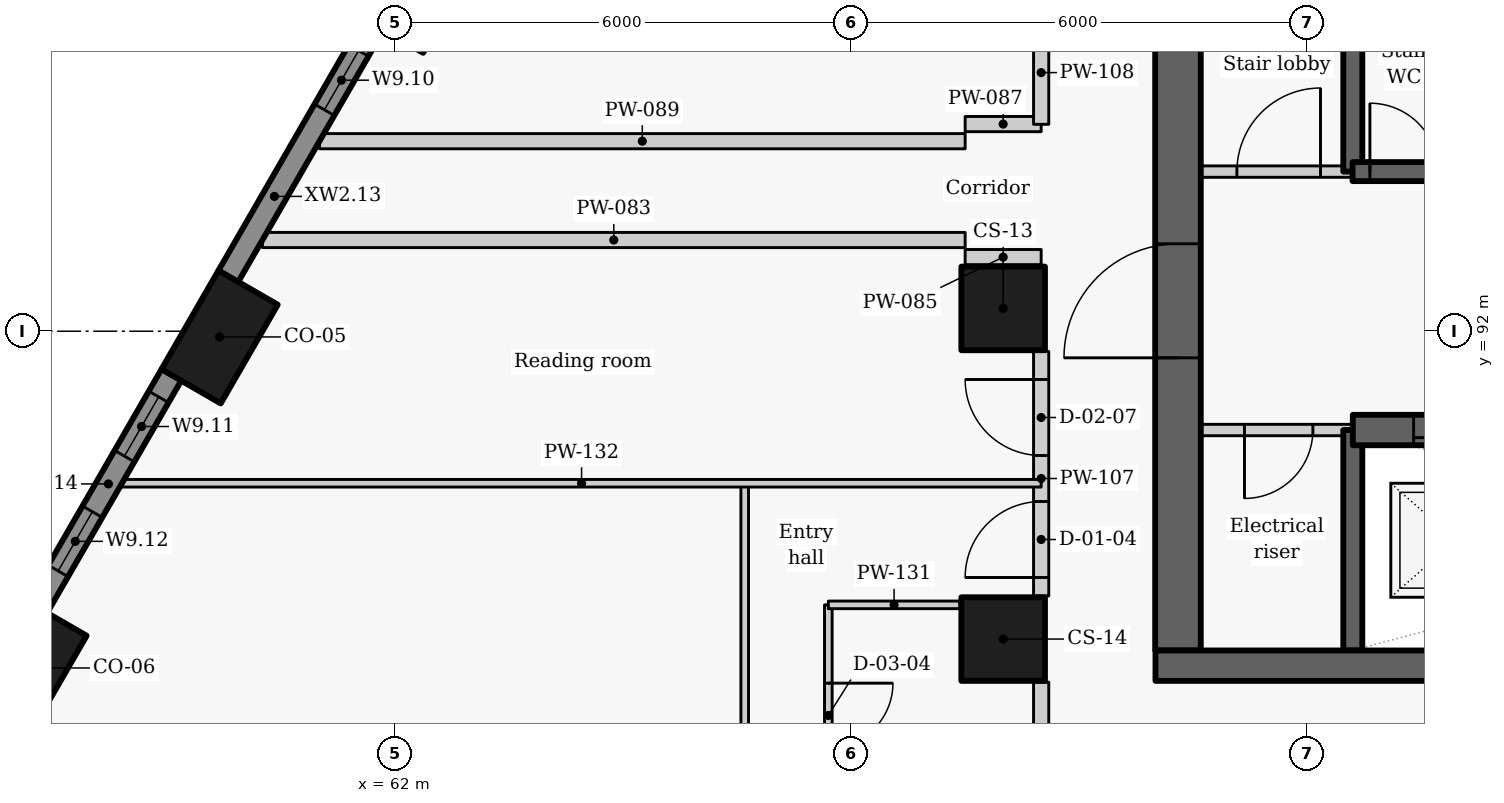
"""IFC4 building model, lengths in metres.
Left out: names, types, materials, properties, quantities, classifications, styles, units other than length and angle.
Written with IfcOpenShell. Run it as: python <this file> out.ifc"""

import sys

from ifc_helpers import new_model, si_unit, direction, frame, frame_2d, origin, origin_2d, place, context, subcontext, project, spatial, rectangle, extrude, element, fill, save


model = new_model("IFC4")
c1 = context("Model", 3, precision=1e-05, world=origin(), true_north=direction((0.0, 1.0)))
c2 = subcontext(c1, "Body", "Model", "MODEL_VIEW")
j1 = project(units=[si_unit("LENGTHUNIT", "METRE"), si_unit("PLANEANGLEUNIT", "RADIAN")], contexts=[c1])
p1 = place(None, origin())
s1 = spatial("IfcSite", under=j1, at=p1, CompositionType="ELEMENT")
p2 = place(p1, origin())
s2 = spatial("IfcBuilding", under=s1, at=p2, CompositionType="ELEMENT")
p3 = place(p2, frame((0.0, 0.0, 51.3)))
s3 = spatial("IfcBuildingStorey", under=s2, at=p3, CompositionType="ELEMENT", Elevation=51.3)
for number, where, z_axis, x_axis in (
    (1, (62.354, 96.537, 0.0), (0.0, 0.0, 1.0), (-0.5, -0.866, 0.0)),
    (2, (59.692, 91.925, 0.0), (0.0, 0.0, 1.0), (-0.5, -0.866, 0.0)),
    (3, (57.177, 87.57, 0.0), (0.0, 0.0, 1.0), (-0.5, -0.866, 0.0)),
):
    element("IfcColumn", number, at=place(p3, frame(where, z_axis=z_axis, x_axis=x_axis)), inside=s3, PredefinedType="COLUMN", context=c2, shape_type="SweptSolid", body=[
        extrude(rectangle(XDim=1.5, YDim=0.9, at=origin_2d()), origin(), (0.0, 0.0, 1.0), 3.3),
    ])
for number, where, z_axis, x_axis in (
    (4, (70.0, 92.3, 0.0), (0.0, 0.0, 1.0), (0.0, -1.0, 0.0)),
    (5, (70.0, 87.95, 0.0), (0.0, 0.0, 1.0), (0.0, -1.0, 0.0)),
):
    element("IfcColumn", number, at=place(p3, frame(where, z_axis=z_axis, x_axis=x_axis)), inside=s3, PredefinedType="COLUMN", context=c2, shape_type="SweptSolid", body=[
        extrude(rectangle(XDim=1.1, YDim=1.1, at=origin_2d()), origin(), (0.0, 0.0, 1.0), 3.3),
    ])
p4 = place(p3, frame((61.722, 96.041, 0.0), z_axis=(0.0, 0.0, 1.0), x_axis=(-0.500001735503, -0.866024401789, 0.0)))
e6 = element("IfcWall", 6, at=p4, inside=s3, PredefinedType="SOLIDWALL", context=c2, shape_type="SweptSolid", body=[
    extrude(rectangle(XDim=3.834, YDim=0.3, at=frame_2d((1.917, 0.0))), origin(), (0.0, 0.0, 1.0), 2.425),
])
p5 = place(p4, frame((0.403, 0.0, 0.9)))
e7 = element("IfcOpeningElement", 7, at=p5, cuts=e6, PredefinedType="OPENING", context=c2, shape_type="SweptSolid", body=[
    extrude(rectangle(XDim=0.9, YDim=1.1, at=frame_2d((0.45, 0.55))), frame((0.0, 0.16, 0.0), z_axis=(0.0, -1.0, 0.0), x_axis=(1.0, 0.0, 0.0)), (0.0, 0.0, 1.0), 0.32),
])
p6 = place(p3, frame((59.059, 91.429, 0.0), z_axis=(0.0, 0.0, 1.0), x_axis=(-0.499977402622, -0.866038449993, 0.0)))
e8 = element("IfcWall", 8, at=p6, inside=s3, PredefinedType="SOLIDWALL", context=c2, shape_type="SweptSolid", body=[
    extrude(rectangle(XDim=3.537, YDim=0.3, at=frame_2d((1.769, 0.0))), origin(), (0.0, 0.0, 1.0), 2.425),
])
p7 = place(p6, frame((0.338, 0.0, 0.9)))
e9 = element("IfcOpeningElement", 9, at=p7, cuts=e8, PredefinedType="OPENING", context=c2, shape_type="SweptSolid", body=[
    extrude(rectangle(XDim=0.9, YDim=1.1, at=frame_2d((0.45, 0.55))), frame((0.0, 0.16, 0.0), z_axis=(0.0, -1.0, 0.0), x_axis=(1.0, 0.0, 0.0)), (0.0, 0.0, 1.0), 0.32),
])
p8 = place(p6, frame((2.082, 0.0, 0.9)))
e10 = element("IfcOpeningElement", 10, at=p8, cuts=e8, PredefinedType="OPENING", context=c2, shape_type="SweptSolid", body=[
    extrude(rectangle(XDim=0.9, YDim=1.1, at=frame_2d((0.45, 0.55))), frame((0.0, 0.16, 0.0), z_axis=(0.0, -1.0, 0.0), x_axis=(1.0, 0.0, 0.0)), (0.0, 0.0, 1.0), 0.32),
])
p9 = place(p3, frame((74.6, 87.8, -0.275), z_axis=(0.0, 0.0, 1.0), x_axis=(0.0, 1.0, 0.0)))
e11 = element("IfcWall", 11, at=p9, inside=s3, PredefinedType="SHEAR", context=c2, shape_type="SweptSolid", body=[
    extrude(rectangle(XDim=2.9, YDim=0.25, at=frame_2d((1.45, 0.0))), origin(), (0.0, 0.0, 1.0), 3.3),
])
p10 = place(p3, frame((74.6, 94.1, -0.275), z_axis=(0.0, 0.0, 1.0), x_axis=(0.0, 1.0, 0.0)))
e12 = element("IfcWall", 12, at=p10, inside=s3, PredefinedType="SHEAR", context=c2, shape_type="SweptSolid", body=[
    extrude(rectangle(XDim=2.8, YDim=0.25, at=frame_2d((1.4, 0.0))), origin(), (0.0, 0.0, 1.0), 3.3),
])
p11 = place(p3, frame((74.6, 90.7, 0.0), z_axis=(0.0, 0.0, 1.0), x_axis=(-1.0, 0.0, 0.0)))
e13 = element("IfcWall", 13, at=p11, inside=s3, PredefinedType="PARTITIONING", context=c2, shape_type="SweptSolid", body=[
    extrude(rectangle(XDim=2.6, YDim=0.15, at=frame_2d((1.3, 0.0))), origin(), (0.0, 0.0, 1.0), 3.025),
])
p12 = place(p11, frame((0.525, 0.0, 0.0)))
e14 = element("IfcOpeningElement", 14, at=p12, cuts=e13, PredefinedType="OPENING", context=c2, shape_type="SweptSolid", body=[
    extrude(rectangle(XDim=0.9, YDim=2.1, at=frame_2d((0.45, 1.05))), frame((0.0, 0.085, 0.0), z_axis=(0.0, -1.0, 0.0), x_axis=(1.0, 0.0, 0.0)), (0.0, 0.0, 1.0), 0.17),
])
p13 = place(p3, frame((72.3, 87.8, -0.275), z_axis=(0.0, 0.0, 1.0), x_axis=(0.0, 1.0, 0.0)))
e15 = element("IfcWall", 15, at=p13, inside=s3, PredefinedType="SHEAR", context=c2, shape_type="SweptSolid", body=[
    extrude(rectangle(XDim=9.1, YDim=0.6, at=frame_2d((4.55, 0.0))), origin(), (0.0, 0.0, 1.0), 3.3),
])
p14 = place(p13, frame((3.85, 0.0, 0.275)))
e16 = element("IfcOpeningElement", 16, at=p14, cuts=e15, PredefinedType="OPENING", context=c2, shape_type="SweptSolid", body=[
    extrude(rectangle(XDim=1.5, YDim=2.1, at=frame_2d((0.75, 1.05))), frame((0.0, 0.31, 0.0), z_axis=(0.0, -1.0, 0.0), x_axis=(1.0, 0.0, 0.0)), (0.0, 0.0, 1.0), 0.62),
])
p15 = place(p3, frame((74.6, 90.7, -0.275), z_axis=(0.0, 0.0, 1.0), x_axis=(1.0, 0.0, 0.0)))
e17 = element("IfcWall", 17, at=p15, inside=s3, PredefinedType="SHEAR", context=c2, shape_type="SweptSolid", body=[
    extrude(rectangle(XDim=10.8, YDim=0.4, at=frame_2d((5.4, 0.0))), origin(), (0.0, 0.0, 1.0), 3.3),
])
p16 = place(p15, frame((0.8, 0.0, 0.275)))
e18 = element("IfcOpeningElement", 18, at=p16, cuts=e17, PredefinedType="OPENING", context=c2, shape_type="SweptSolid", body=[
    extrude(rectangle(XDim=1.1, YDim=2.1, at=frame_2d((0.55, 1.05))), frame((0.0, 0.21, 0.0), z_axis=(0.0, -1.0, 0.0), x_axis=(1.0, 0.0, 0.0)), (0.0, 0.0, 1.0), 0.42),
])
p17 = place(p15, frame((3.5, 0.0, 0.275)))
e19 = element("IfcOpeningElement", 19, at=p17, cuts=e17, PredefinedType="OPENING", context=c2, shape_type="SweptSolid", body=[
    extrude(rectangle(XDim=1.1, YDim=2.1, at=frame_2d((0.55, 1.05))), frame((0.0, 0.21, 0.0), z_axis=(0.0, -1.0, 0.0), x_axis=(1.0, 0.0, 0.0)), (0.0, 0.0, 1.0), 0.42),
])
p18 = place(p15, frame((6.2, 0.0, 0.275)))
e20 = element("IfcOpeningElement", 20, at=p18, cuts=e17, PredefinedType="OPENING", context=c2, shape_type="SweptSolid", body=[
    extrude(rectangle(XDim=1.1, YDim=2.1, at=frame_2d((0.55, 1.05))), frame((0.0, 0.21, 0.0), z_axis=(0.0, -1.0, 0.0), x_axis=(1.0, 0.0, 0.0)), (0.0, 0.0, 1.0), 0.42),
])
p19 = place(p3, frame((72.0, 94.1, 0.0), z_axis=(0.0, 0.0, 1.0), x_axis=(1.0, 0.0, 0.0)))
e21 = element("IfcWall", 21, at=p19, inside=s3, PredefinedType="PARTITIONING", context=c2, shape_type="SweptSolid", body=[
    extrude(rectangle(XDim=2.603, YDim=0.15, at=frame_2d((1.302, 0.0))), origin(), (0.0, 0.0, 1.0), 3.025),
])
p20 = place(p19, frame((1.075, 0.0, 0.0)))
e22 = element("IfcOpeningElement", 22, at=p20, cuts=e21, PredefinedType="OPENING", context=c2, shape_type="SweptSolid", body=[
    extrude(rectangle(XDim=1.1, YDim=2.1, at=frame_2d((0.55, 1.05))), frame((0.0, 0.085, 0.0), z_axis=(0.0, -1.0, 0.0), x_axis=(1.0, 0.0, 0.0)), (0.0, 0.0, 1.0), 0.17),
])
p21 = place(p3, frame((74.597, 94.1, -0.275), z_axis=(0.0, 0.0, 1.0), x_axis=(1.0, 0.0, 0.0)))
e23 = element("IfcWall", 23, at=p21, inside=s3, PredefinedType="SHEAR", context=c2, shape_type="SweptSolid", body=[
    extrude(rectangle(XDim=2.706, YDim=0.25, at=frame_2d((1.353, 0.0))), origin(), (0.0, 0.0, 1.0), 3.3),
])
p22 = place(p21, frame((0.228, 0.0, 0.275)))
e24 = element("IfcOpeningElement", 24, at=p22, cuts=e23, PredefinedType="OPENING", context=c2, shape_type="SweptSolid", body=[
    extrude(rectangle(XDim=0.9, YDim=2.1, at=frame_2d((0.45, 1.05))), frame((0.0, 0.135, 0.0), z_axis=(0.0, -1.0, 0.0), x_axis=(1.0, 0.0, 0.0)), (0.0, 0.0, 1.0), 0.27),
])
p23 = place(p21, frame((1.578, 0.0, 0.275)))
e25 = element("IfcOpeningElement", 25, at=p23, cuts=e23, PredefinedType="OPENING", context=c2, shape_type="SweptSolid", body=[
    extrude(rectangle(XDim=0.9, YDim=2.1, at=frame_2d((0.45, 1.05))), frame((0.0, 0.135, 0.0), z_axis=(0.0, -1.0, 0.0), x_axis=(1.0, 0.0, 0.0)), (0.0, 0.0, 1.0), 0.27),
])
p24 = place(p3, frame((60.255, 93.2, 0.0), z_axis=(0.0, 0.0, 1.0), x_axis=(1.0, 0.0, 0.0)))
e26 = element("IfcWall", 26, at=p24, inside=s3, PredefinedType="PARTITIONING", context=c2, shape_type="SweptSolid", body=[
    extrude(rectangle(XDim=9.245, YDim=0.2, at=frame_2d((4.623, 0.0))), origin(), (0.0, 0.0, 1.0), 2.405),
])
for number, where, z_axis, x_axis in (
    (27, (69.5, 92.975, 0.0), (0.0, 0.0, 1.0), (1.0, 0.0, 0.0)),
    (28, (69.5, 94.725, 0.0), (0.0, 0.0, 1.0), (1.0, 0.0, 0.0)),
):
    element("IfcWall", number, at=place(p3, frame(where, z_axis=z_axis, x_axis=x_axis)), inside=s3, PredefinedType="PARTITIONING", context=c2, shape_type="SweptSolid", body=[
        extrude(rectangle(XDim=1.0, YDim=0.2, at=frame_2d((0.5, 0.0))), origin(), (0.0, 0.0, 1.0), 2.505),
    ])
p25 = place(p3, frame((61.005, 94.5, 0.0), z_axis=(0.0, 0.0, 1.0), x_axis=(1.0, 0.0, 0.0)))
e29 = element("IfcWall", 29, at=p25, inside=s3, PredefinedType="PARTITIONING", context=c2, shape_type="SweptSolid", body=[
    extrude(rectangle(XDim=8.495, YDim=0.2, at=frame_2d((4.248, 0.0))), origin(), (0.0, 0.0, 1.0), 2.405),
])
p26 = place(p3, frame((70.5, 83.217, 0.0), z_axis=(0.0, 0.0, 1.0), x_axis=(0.0, 1.0, 0.0)))
e30 = element("IfcWall", 30, at=p26, inside=s3, PredefinedType="PARTITIONING", context=c2, shape_type="SweptSolid", body=[
    extrude(rectangle(XDim=4.166, YDim=0.2, at=frame_2d((2.083, 0.0))), origin(), (0.0, 0.0, 1.0), 3.025),
])
p27 = place(p3, frame((70.5, 88.517, 0.0), z_axis=(0.0, 0.0, 1.0), x_axis=(0.0, 1.0, 0.0)))
e31 = element("IfcWall", 31, at=p27, inside=s3, PredefinedType="PARTITIONING", context=c2, shape_type="SweptSolid", body=[
    extrude(rectangle(XDim=3.216, YDim=0.2, at=frame_2d((1.608, 0.0))), origin(), (0.0, 0.0, 1.0), 3.025),
])
p28 = place(p27, frame((0.243, 0.0, 0.0)))
e32 = element("IfcOpeningElement", 32, at=p28, cuts=e31, PredefinedType="OPENING", context=c2, shape_type="SweptSolid", body=[
    extrude(rectangle(XDim=1.0, YDim=2.1, at=frame_2d((0.5, 1.05))), frame((0.0, 0.11, 0.0), z_axis=(0.0, -1.0, 0.0), x_axis=(1.0, 0.0, 0.0)), (0.0, 0.0, 1.0), 0.22),
])
p29 = place(p27, frame((1.848, 0.0, 0.0)))
e33 = element("IfcOpeningElement", 33, at=p29, cuts=e31, PredefinedType="OPENING", context=c2, shape_type="SweptSolid", body=[
    extrude(rectangle(XDim=1.0, YDim=2.1, at=frame_2d((0.5, 1.05))), frame((0.0, 0.11, 0.0), z_axis=(0.0, -1.0, 0.0), x_axis=(1.0, 0.0, 0.0)), (0.0, 0.0, 1.0), 0.22),
])
p30 = place(p3, frame((70.5, 94.722, 0.0), z_axis=(0.0, 0.0, 1.0), x_axis=(0.0, 1.0, 0.0)))
e34 = element("IfcWall", 34, at=p30, inside=s3, PredefinedType="PARTITIONING", context=c2, shape_type="SweptSolid", body=[
    extrude(rectangle(XDim=1.361, YDim=0.2, at=frame_2d((0.681, 0.0))), origin(), (0.0, 0.0, 1.0), 3.025),
])
p31 = place(p3, frame((67.7, 88.4, 0.0), z_axis=(0.0, 0.0, 1.0), x_axis=(0.0, -1.0, 0.0)))
e35 = element("IfcWall", 35, at=p31, inside=s3, PredefinedType="PARTITIONING", context=c2, shape_type="SweptSolid", body=[
    extrude(rectangle(XDim=14.3, YDim=0.1, at=frame_2d((7.15, 0.0))), origin(), (0.0, 0.0, 1.0), 3.025),
])
p32 = place(p31, frame((12.08, 0.0, 0.0)))
e36 = element("IfcOpeningElement", 36, at=p32, cuts=e35, PredefinedType="OPENING", context=c2, shape_type="SweptSolid", body=[
    extrude(rectangle(XDim=0.85, YDim=2.1, at=frame_2d((0.425, 1.05))), frame((0.0, 0.06, 0.0), z_axis=(0.0, -1.0, 0.0), x_axis=(1.0, 0.0, 0.0)), (0.0, 0.0, 1.0), 0.12),
])
p33 = place(p31, frame((8.105, 0.0, 0.0)))
e37 = element("IfcOpeningElement", 37, at=p33, cuts=e35, PredefinedType="OPENING", context=c2, shape_type="SweptSolid", body=[
    extrude(rectangle(XDim=0.9, YDim=2.1, at=frame_2d((0.45, 1.05))), frame((0.0, 0.06, 0.0), z_axis=(0.0, -1.0, 0.0), x_axis=(1.0, 0.0, 0.0)), (0.0, 0.0, 1.0), 0.12),
])
p34 = place(p31, frame((4.205, 0.0, 0.0)))
e38 = element("IfcOpeningElement", 38, at=p34, cuts=e35, PredefinedType="OPENING", context=c2, shape_type="SweptSolid", body=[
    extrude(rectangle(XDim=0.9, YDim=2.1, at=frame_2d((0.45, 1.05))), frame((0.0, 0.06, 0.0), z_axis=(0.0, -1.0, 0.0), x_axis=(1.0, 0.0, 0.0)), (0.0, 0.0, 1.0), 0.12),
])
p35 = place(p31, frame((1.03, 0.0, 0.0)))
e39 = element("IfcOpeningElement", 39, at=p35, cuts=e35, PredefinedType="OPENING", context=c2, shape_type="SweptSolid", body=[
    extrude(rectangle(XDim=0.85, YDim=2.1, at=frame_2d((0.425, 1.05))), frame((0.0, 0.06, 0.0), z_axis=(0.0, -1.0, 0.0), x_axis=(1.0, 0.0, 0.0)), (0.0, 0.0, 1.0), 0.12),
])
p36 = place(p3, frame((66.6, 72.0, 0.0), z_axis=(0.0, 0.0, 1.0), x_axis=(0.0, 1.0, 0.0)))
e40 = element("IfcWall", 40, at=p36, inside=s3, PredefinedType="PARTITIONING", context=c2, shape_type="SweptSolid", body=[
    extrude(rectangle(XDim=18.0, YDim=0.1, at=frame_2d((9.0, 0.0))), origin(), (0.0, 0.0, 1.0), 3.025),
])
p37 = place(p36, frame((1.002, 0.0, 0.0)))
e41 = element("IfcOpeningElement", 41, at=p37, cuts=e40, PredefinedType="OPENING", context=c2, shape_type="SweptSolid", body=[
    extrude(rectangle(XDim=0.9, YDim=2.1, at=frame_2d((0.45, 1.05))), frame((0.0, 0.06, 0.0), z_axis=(0.0, -1.0, 0.0), x_axis=(1.0, 0.0, 0.0)), (0.0, 0.0, 1.0), 0.12),
])
p38 = place(p36, frame((4.55, 0.0, 0.0)))
e42 = element("IfcOpeningElement", 42, at=p38, cuts=e40, PredefinedType="OPENING", context=c2, shape_type="SweptSolid", body=[
    extrude(rectangle(XDim=0.9, YDim=2.1, at=frame_2d((0.45, 1.05))), frame((0.0, 0.06, 0.0), z_axis=(0.0, -1.0, 0.0), x_axis=(1.0, 0.0, 0.0)), (0.0, 0.0, 1.0), 0.12),
])
p39 = place(p36, frame((8.098, 0.0, 0.0)))
e43 = element("IfcOpeningElement", 43, at=p39, cuts=e40, PredefinedType="OPENING", context=c2, shape_type="SweptSolid", body=[
    extrude(rectangle(XDim=0.9, YDim=2.1, at=frame_2d((0.45, 1.05))), frame((0.0, 0.06, 0.0), z_axis=(0.0, -1.0, 0.0), x_axis=(1.0, 0.0, 0.0)), (0.0, 0.0, 1.0), 0.12),
])
p40 = place(p36, frame((13.55, 0.0, 0.0)))
e44 = element("IfcOpeningElement", 44, at=p40, cuts=e40, PredefinedType="OPENING", context=c2, shape_type="SweptSolid", body=[
    extrude(rectangle(XDim=0.9, YDim=2.1, at=frame_2d((0.45, 1.05))), frame((0.0, 0.06, 0.0), z_axis=(0.0, -1.0, 0.0), x_axis=(1.0, 0.0, 0.0)), (0.0, 0.0, 1.0), 0.12),
])
p41 = place(p3, frame((67.7, 88.4, 0.0), z_axis=(0.0, 0.0, 1.0), x_axis=(1.0, 0.0, 0.0)))
e45 = element("IfcWall", 45, at=p41, inside=s3, PredefinedType="PARTITIONING", context=c2, shape_type="SweptSolid", body=[
    extrude(rectangle(XDim=1.73, YDim=0.1, at=frame_2d((0.865, 0.0))), origin(), (0.0, 0.0, 1.0), 3.025),
])
p42 = place(p3, frame((58.407, 90.0, 0.0), z_axis=(0.0, 0.0, 1.0), x_axis=(1.0, 0.0, 0.0)))
e46 = element("IfcWall", 46, at=p42, inside=s3, PredefinedType="PARTITIONING", context=c2, shape_type="SweptSolid", body=[
    extrude(rectangle(XDim=12.093, YDim=0.1, at=frame_2d((6.046, 0.0))), origin(), (0.0, 0.0, 1.0), 2.405),
])
p43 = place(p3, frame((72.004, 87.6, -0.275), z_axis=(0.0, 0.0, 1.0), x_axis=(1.0, 0.0, 0.0)))
e47 = element("IfcWall", 47, at=p43, inside=s3, PredefinedType="SHEAR", context=c2, shape_type="SweptSolid", body=[
    extrude(rectangle(XDim=15.992, YDim=0.4, at=frame_2d((7.996, 0.0))), origin(), (0.0, 0.0, 1.0), 3.3),
])
p44 = place(p5, origin())
e48 = element("IfcWindow", 48, at=p44, inside=s3, PartitioningType="SINGLE_PANEL", PredefinedType="WINDOW", context=c2, shape_type="SweptSolid", body=[
    extrude(rectangle(XDim=0.9, YDim=1.1, at=frame_2d((0.45, 0.55))), frame((0.0, 0.03, 0.0), z_axis=(0.0, -1.0, 0.0), x_axis=(1.0, 0.0, 0.0)), (0.0, 0.0, 1.0), 0.06),
])
fill(e7, e48)
p45 = place(p7, origin())
e49 = element("IfcWindow", 49, at=p45, inside=s3, PartitioningType="SINGLE_PANEL", PredefinedType="WINDOW", context=c2, shape_type="SweptSolid", body=[
    extrude(rectangle(XDim=0.9, YDim=1.1, at=frame_2d((0.45, 0.55))), frame((0.0, 0.03, 0.0), z_axis=(0.0, -1.0, 0.0), x_axis=(1.0, 0.0, 0.0)), (0.0, 0.0, 1.0), 0.06),
])
fill(e9, e49)
p46 = place(p8, origin())
e50 = element("IfcWindow", 50, at=p46, inside=s3, PartitioningType="SINGLE_PANEL", PredefinedType="WINDOW", context=c2, shape_type="SweptSolid", body=[
    extrude(rectangle(XDim=0.9, YDim=1.1, at=frame_2d((0.45, 0.55))), frame((0.0, 0.03, 0.0), z_axis=(0.0, -1.0, 0.0), x_axis=(1.0, 0.0, 0.0)), (0.0, 0.0, 1.0), 0.06),
])
fill(e10, e50)
p47 = place(p12, origin())
e51 = element("IfcDoor", 51, at=p47, inside=s3, OperationType="SINGLE_SWING_RIGHT", PredefinedType="DOOR", context=c2, shape_type="SweptSolid", body=[
    extrude(rectangle(XDim=0.9, YDim=2.1, at=frame_2d((0.45, 1.05))), frame((0.0, 0.025, 0.0), z_axis=(0.0, -1.0, 0.0), x_axis=(1.0, 0.0, 0.0)), (0.0, 0.0, 1.0), 0.05),
])
fill(e14, e51)
p48 = place(p16, origin())
e52 = element("IfcDoor", 52, at=p48, inside=s3, OperationType="SLIDING_TO_LEFT", PredefinedType="DOOR", context=c2, shape_type="SweptSolid", body=[
    extrude(rectangle(XDim=1.1, YDim=2.1, at=frame_2d((0.55, 1.05))), frame((0.0, 0.025, 0.0), z_axis=(0.0, -1.0, 0.0), x_axis=(1.0, 0.0, 0.0)), (0.0, 0.0, 1.0), 0.05),
])
fill(e18, e52)
p49 = place(p20, origin())
e53 = element("IfcDoor", 53, at=p49, inside=s3, OperationType="SINGLE_SWING_RIGHT", PredefinedType="DOOR", context=c2, shape_type="SweptSolid", body=[
    extrude(rectangle(XDim=1.1, YDim=2.1, at=frame_2d((0.55, 1.05))), frame((0.0, 0.025, 0.0), z_axis=(0.0, -1.0, 0.0), x_axis=(1.0, 0.0, 0.0)), (0.0, 0.0, 1.0), 0.05),
])
fill(e22, e53)
p50 = place(p22, origin())
e54 = element("IfcDoor", 54, at=p50, inside=s3, OperationType="SINGLE_SWING_LEFT", PredefinedType="DOOR", context=c2, shape_type="SweptSolid", body=[
    extrude(rectangle(XDim=0.9, YDim=2.1, at=frame_2d((0.45, 1.05))), frame((0.0, 0.025, 0.0), z_axis=(0.0, -1.0, 0.0), x_axis=(1.0, 0.0, 0.0)), (0.0, 0.0, 1.0), 0.05),
])
fill(e24, e54)
p51 = place(p28, origin())
e55 = element("IfcDoor", 55, at=p51, inside=s3, OperationType="SINGLE_SWING_LEFT", PredefinedType="DOOR", context=c2, shape_type="SweptSolid", body=[
    extrude(rectangle(XDim=1.0, YDim=2.1, at=frame_2d((0.5, 1.05))), frame((0.0, 0.025, 0.0), z_axis=(0.0, -1.0, 0.0), x_axis=(1.0, 0.0, 0.0)), (0.0, 0.0, 1.0), 0.05),
])
fill(e32, e55)
p52 = place(p35, origin())
e56 = element("IfcDoor", 56, at=p52, inside=s3, OperationType="SINGLE_SWING_LEFT", PredefinedType="DOOR", context=c2, shape_type="SweptSolid", body=[
    extrude(rectangle(XDim=0.85, YDim=2.1, at=frame_2d((0.425, 1.05))), frame((0.0, 0.025, 0.0), z_axis=(0.0, -1.0, 0.0), x_axis=(1.0, 0.0, 0.0)), (0.0, 0.0, 1.0), 0.05),
])
fill(e39, e56)
p53 = place(p29, origin())
e57 = element("IfcDoor", 57, at=p53, inside=s3, OperationType="SINGLE_SWING_RIGHT", PredefinedType="DOOR", context=c2, shape_type="SweptSolid", body=[
    extrude(rectangle(XDim=1.0, YDim=2.1, at=frame_2d((0.5, 1.05))), frame((0.0, 0.025, 0.0), z_axis=(0.0, -1.0, 0.0), x_axis=(1.0, 0.0, 0.0)), (0.0, 0.0, 1.0), 0.05),
])
fill(e33, e57)
p54 = place(p14, origin())
e58 = element("IfcDoor", 58, at=p54, inside=s3, OperationType="DOUBLE_DOOR_SINGLE_SWING", PredefinedType="DOOR", context=c2, shape_type="SweptSolid", body=[
    extrude(rectangle(XDim=1.5, YDim=2.1, at=frame_2d((0.75, 1.05))), frame((0.0, 0.025, 0.0), z_axis=(0.0, -1.0, 0.0), x_axis=(1.0, 0.0, 0.0)), (0.0, 0.0, 1.0), 0.05),
])
fill(e16, e58)
save(model, sys.argv[1])
